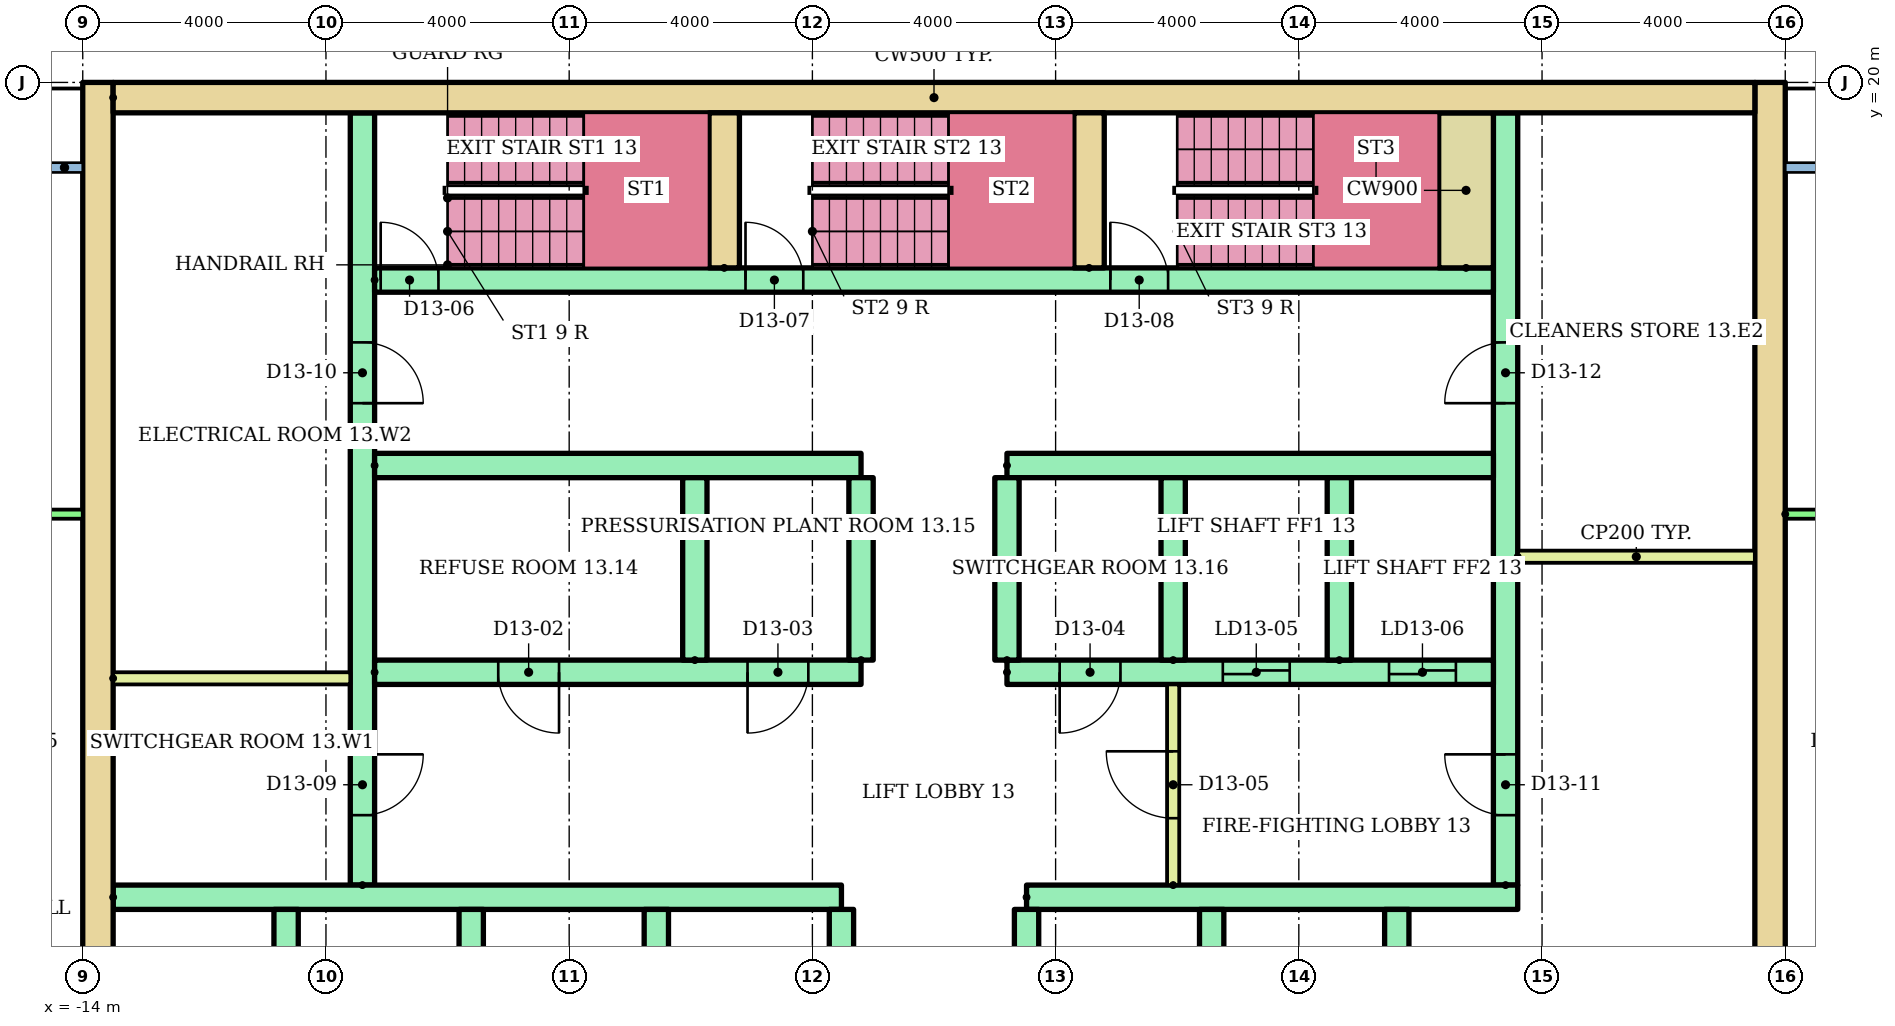
"""IFC4 building model, lengths in metres.
Left out: names, types, materials, properties, quantities, classifications, styles, units other than length and angle.
Written with IfcOpenShell. Run it as: python <this file> out.ifc"""

import sys

from ifc_helpers import new_model, si_unit, direction, frame, frame_2d, origin, place, context, subcontext, project, spatial, rectangle, extrude, element, fill, save


model = new_model("IFC4")
c1 = context("Model", 3, precision=1e-05, world=origin(), true_north=direction((0.0, 1.0)))
c2 = subcontext(c1, "Body", "Model", "MODEL_VIEW")
j1 = project(units=[si_unit("LENGTHUNIT", "METRE"), si_unit("PLANEANGLEUNIT", "RADIAN")], contexts=[c1])
p1 = place(None, origin())
s1 = spatial("IfcSite", under=j1, at=p1, CompositionType="ELEMENT")
p2 = place(p1, origin())
s2 = spatial("IfcBuilding", under=s1, at=p2, CompositionType="ELEMENT")
p3 = place(p2, frame((0.0, 0.0, 51.2)))
s3 = spatial("IfcBuildingStorey", under=s2, at=p3, CompositionType="ELEMENT", Elevation=51.2)
for number, where, z_axis, x_axis in (
    (1, (-13.75, 3.0, 0.0), (0.0, 0.0, 1.0), (0.0, 1.0, 0.0)),
    (2, (13.75, 3.0, 0.0), (0.0, 0.0, 1.0), (0.0, 1.0, 0.0)),
):
    element("IfcWall", number, at=place(p3, frame(where, z_axis=z_axis, x_axis=x_axis)), inside=s3, PredefinedType="SHEAR", context=c2, shape_type="SweptSolid", body=[
        extrude(rectangle(XDim=17.0, YDim=0.5, at=frame_2d((8.5, 0.0))), origin(), (0.0, 0.0, 1.0), 2.92),
    ])
p4 = place(p3, frame((-13.5, 19.75, 0.0)))
e3 = element("IfcWall", 3, at=p4, inside=s3, PredefinedType="SHEAR", context=c2, shape_type="SweptSolid", body=[
    extrude(rectangle(XDim=27.0, YDim=0.5, at=frame_2d((13.5, 0.0))), origin(), (0.0, 0.0, 1.0), 2.92),
])
p5 = place(p3, frame((-9.4, 6.8, 0.0), z_axis=(0.0, 0.0, 1.0), x_axis=(0.0, 1.0, 0.0)))
e4 = element("IfcWall", 4, at=p5, inside=s3, PredefinedType="SHEAR", context=c2, shape_type="SweptSolid", body=[
    extrude(rectangle(XDim=12.7, YDim=0.4, at=frame_2d((6.35, 0.0))), origin(), (0.0, 0.0, 1.0), 2.92),
])
p6 = place(p5, frame((1.15, 0.0, 0.0)))
e5 = element("IfcOpeningElement", 5, at=p6, cuts=e4, PredefinedType="OPENING", context=c2, shape_type="SweptSolid", body=[
    extrude(rectangle(XDim=1.0, YDim=2.1, at=frame_2d((0.5, 1.05))), frame((0.0, 0.21, 0.0), z_axis=(0.0, -1.0, 0.0), x_axis=(1.0, 0.0, 0.0)), (0.0, 0.0, 1.0), 0.42),
])
p7 = place(p5, frame((7.925, 0.0, 0.0)))
e6 = element("IfcOpeningElement", 6, at=p7, cuts=e4, PredefinedType="OPENING", context=c2, shape_type="SweptSolid", body=[
    extrude(rectangle(XDim=1.0, YDim=2.1, at=frame_2d((0.5, 1.05))), frame((0.0, 0.21, 0.0), z_axis=(0.0, -1.0, 0.0), x_axis=(1.0, 0.0, 0.0)), (0.0, 0.0, 1.0), 0.42),
])
p8 = place(p3, frame((9.4, 6.8, 0.0), z_axis=(0.0, 0.0, 1.0), x_axis=(0.0, 1.0, 0.0)))
e7 = element("IfcWall", 7, at=p8, inside=s3, PredefinedType="SHEAR", context=c2, shape_type="SweptSolid", body=[
    extrude(rectangle(XDim=12.7, YDim=0.4, at=frame_2d((6.35, 0.0))), origin(), (0.0, 0.0, 1.0), 2.92),
])
p9 = place(p8, frame((1.15, 0.0, 0.0)))
e8 = element("IfcOpeningElement", 8, at=p9, cuts=e7, PredefinedType="OPENING", context=c2, shape_type="SweptSolid", body=[
    extrude(rectangle(XDim=1.0, YDim=2.1, at=frame_2d((0.5, 1.05))), frame((0.0, 0.21, 0.0), z_axis=(0.0, -1.0, 0.0), x_axis=(1.0, 0.0, 0.0)), (0.0, 0.0, 1.0), 0.42),
])
p10 = place(p8, frame((7.925, 0.0, 0.0)))
e9 = element("IfcOpeningElement", 9, at=p10, cuts=e7, PredefinedType="OPENING", context=c2, shape_type="SweptSolid", body=[
    extrude(rectangle(XDim=1.0, YDim=2.1, at=frame_2d((0.5, 1.05))), frame((0.0, 0.21, 0.0), z_axis=(0.0, -1.0, 0.0), x_axis=(1.0, 0.0, 0.0)), (0.0, 0.0, 1.0), 0.42),
])
p11 = place(p3, frame((-13.5, 6.6, 0.0)))
e10 = element("IfcWall", 10, at=p11, inside=s3, PredefinedType="SHEAR", context=c2, shape_type="SweptSolid", body=[
    extrude(rectangle(XDim=11.978, YDim=0.4, at=frame_2d((5.989, 0.0))), origin(), (0.0, 0.0, 1.0), 2.92),
])
p12 = place(p3, frame((1.522, 6.6, 0.0)))
e11 = element("IfcWall", 11, at=p12, inside=s3, PredefinedType="SHEAR", context=c2, shape_type="SweptSolid", body=[
    extrude(rectangle(XDim=8.078, YDim=0.4, at=frame_2d((4.039, 0.0))), origin(), (0.0, 0.0, 1.0), 2.92),
])
for number, where, z_axis, x_axis in (
    (12, (-10.656, 3.4, 0.0), (0.0, 0.0, 1.0), (0.0, 1.0, 0.0)),
    (13, (-7.611, 3.4, 0.0), (0.0, 0.0, 1.0), (0.0, 1.0, 0.0)),
    (14, (-4.567, 3.4, 0.0), (0.0, 0.0, 1.0), (0.0, 1.0, 0.0)),
    (15, (-1.522, 3.4, 0.0), (0.0, 0.0, 1.0), (0.0, 1.0, 0.0)),
    (16, (1.522, 3.4, 0.0), (0.0, 0.0, 1.0), (0.0, 1.0, 0.0)),
    (17, (4.567, 3.4, 0.0), (0.0, 0.0, 1.0), (0.0, 1.0, 0.0)),
    (18, (7.611, 3.4, 0.0), (0.0, 0.0, 1.0), (0.0, 1.0, 0.0)),
):
    element("IfcWall", number, at=place(p3, frame(where, z_axis=z_axis, x_axis=x_axis)), inside=s3, PredefinedType="SHEAR", context=c2, shape_type="SweptSolid", body=[
        extrude(rectangle(XDim=3.0, YDim=0.4, at=frame_2d((1.5, 0.0))), origin(), (0.0, 0.0, 1.0), 2.92),
    ])
p13 = place(p3, frame((-9.2, 10.3, 0.0)))
e19 = element("IfcWall", 19, at=p13, inside=s3, PredefinedType="SHEAR", context=c2, shape_type="SweptSolid", body=[
    extrude(rectangle(XDim=8.0, YDim=0.4, at=frame_2d((4.0, 0.0))), origin(), (0.0, 0.0, 1.0), 2.92),
])
p14 = place(p13, frame((2.033, 0.0, 0.0)))
e20 = element("IfcOpeningElement", 20, at=p14, cuts=e19, PredefinedType="OPENING", context=c2, shape_type="SweptSolid", body=[
    extrude(rectangle(XDim=1.0, YDim=2.1, at=frame_2d((0.5, 1.05))), frame((0.0, 0.21, 0.0), z_axis=(0.0, -1.0, 0.0), x_axis=(1.0, 0.0, 0.0)), (0.0, 0.0, 1.0), 0.42),
])
p15 = place(p13, frame((6.133, 0.0, 0.0)))
e21 = element("IfcOpeningElement", 21, at=p15, cuts=e19, PredefinedType="OPENING", context=c2, shape_type="SweptSolid", body=[
    extrude(rectangle(XDim=1.0, YDim=2.1, at=frame_2d((0.5, 1.05))), frame((0.0, 0.21, 0.0), z_axis=(0.0, -1.0, 0.0), x_axis=(1.0, 0.0, 0.0)), (0.0, 0.0, 1.0), 0.42),
])
p16 = place(p3, frame((-9.2, 13.7, 0.0)))
e22 = element("IfcWall", 22, at=p16, inside=s3, PredefinedType="SHEAR", context=c2, shape_type="SweptSolid", body=[
    extrude(rectangle(XDim=8.0, YDim=0.4, at=frame_2d((4.0, 0.0))), origin(), (0.0, 0.0, 1.0), 2.92),
])
p17 = place(p3, frame((1.2, 10.3, 0.0)))
e23 = element("IfcWall", 23, at=p17, inside=s3, PredefinedType="SHEAR", context=c2, shape_type="SweptSolid", body=[
    extrude(rectangle(XDim=8.0, YDim=0.4, at=frame_2d((4.0, 0.0))), origin(), (0.0, 0.0, 1.0), 2.92),
])
p18 = place(p17, frame((3.55, 0.0, 0.0)))
e24 = element("IfcOpeningElement", 24, at=p18, cuts=e23, PredefinedType="OPENING", context=c2, shape_type="SweptSolid", body=[
    extrude(rectangle(XDim=1.1, YDim=2.1, at=frame_2d((0.55, 1.05))), frame((0.0, 0.21, 0.0), z_axis=(0.0, -1.0, 0.0), x_axis=(1.0, 0.0, 0.0)), (0.0, 0.0, 1.0), 0.42),
])
p19 = place(p17, frame((6.283, 0.0, 0.0)))
e25 = element("IfcOpeningElement", 25, at=p19, cuts=e23, PredefinedType="OPENING", context=c2, shape_type="SweptSolid", body=[
    extrude(rectangle(XDim=1.1, YDim=2.1, at=frame_2d((0.55, 1.05))), frame((0.0, 0.21, 0.0), z_axis=(0.0, -1.0, 0.0), x_axis=(1.0, 0.0, 0.0)), (0.0, 0.0, 1.0), 0.42),
])
p20 = place(p17, frame((0.867, 0.0, 0.0)))
e26 = element("IfcOpeningElement", 26, at=p20, cuts=e23, PredefinedType="OPENING", context=c2, shape_type="SweptSolid", body=[
    extrude(rectangle(XDim=1.0, YDim=2.1, at=frame_2d((0.5, 1.05))), frame((0.0, 0.21, 0.0), z_axis=(0.0, -1.0, 0.0), x_axis=(1.0, 0.0, 0.0)), (0.0, 0.0, 1.0), 0.42),
])
p21 = place(p3, frame((1.2, 13.7, 0.0)))
e27 = element("IfcWall", 27, at=p21, inside=s3, PredefinedType="SHEAR", context=c2, shape_type="SweptSolid", body=[
    extrude(rectangle(XDim=8.0, YDim=0.4, at=frame_2d((4.0, 0.0))), origin(), (0.0, 0.0, 1.0), 2.92),
])
for number, where, z_axis, x_axis in (
    (28, (-3.933, 10.5, 0.0), (0.0, 0.0, 1.0), (0.0, 1.0, 0.0)),
    (29, (-1.2, 10.5, 0.0), (0.0, 0.0, 1.0), (0.0, 1.0, 0.0)),
    (30, (1.2, 10.5, 0.0), (0.0, 0.0, 1.0), (0.0, 1.0, 0.0)),
    (31, (3.933, 10.5, 0.0), (0.0, 0.0, 1.0), (0.0, 1.0, 0.0)),
    (32, (6.667, 10.5, 0.0), (0.0, 0.0, 1.0), (0.0, 1.0, 0.0)),
):
    element("IfcWall", number, at=place(p3, frame(where, z_axis=z_axis, x_axis=x_axis)), inside=s3, PredefinedType="SHEAR", context=c2, shape_type="SweptSolid", body=[
        extrude(rectangle(XDim=3.0, YDim=0.4, at=frame_2d((1.5, 0.0))), origin(), (0.0, 0.0, 1.0), 2.92),
    ])
p22 = place(p3, frame((3.933, 6.8, 0.0), z_axis=(0.0, 0.0, 1.0), x_axis=(0.0, 1.0, 0.0)))
e33 = element("IfcWall", 33, at=p22, inside=s3, PredefinedType="PARTITIONING", context=c2, shape_type="SweptSolid", body=[
    extrude(rectangle(XDim=3.3, YDim=0.2, at=frame_2d((1.65, 0.0))), origin(), (0.0, 0.0, 1.0), 2.92),
])
p23 = place(p22, frame((1.1, 0.0, 0.0)))
e34 = element("IfcOpeningElement", 34, at=p23, cuts=e33, PredefinedType="OPENING", context=c2, shape_type="SweptSolid", body=[
    extrude(rectangle(XDim=1.1, YDim=2.1, at=frame_2d((0.55, 1.05))), frame((0.0, 0.11, 0.0), z_axis=(0.0, -1.0, 0.0), x_axis=(1.0, 0.0, 0.0)), (0.0, 0.0, 1.0), 0.22),
])
p24 = place(p3, frame((-9.2, 16.75, 0.0)))
e35 = element("IfcWall", 35, at=p24, inside=s3, PredefinedType="SHEAR", context=c2, shape_type="SweptSolid", body=[
    extrude(rectangle(XDim=18.4, YDim=0.4, at=frame_2d((9.2, 0.0))), origin(), (0.0, 0.0, 1.0), 2.92),
])
p25 = place(p24, frame((0.1, 0.0, 0.0)))
e36 = element("IfcOpeningElement", 36, at=p25, cuts=e35, PredefinedType="OPENING", context=c2, shape_type="SweptSolid", body=[
    extrude(rectangle(XDim=0.95, YDim=2.1, at=frame_2d((0.475, 1.05))), frame((0.0, 0.21, 0.0), z_axis=(0.0, -1.0, 0.0), x_axis=(1.0, 0.0, 0.0)), (0.0, 0.0, 1.0), 0.42),
])
p26 = place(p24, frame((6.1, 0.0, 0.0)))
e37 = element("IfcOpeningElement", 37, at=p26, cuts=e35, PredefinedType="OPENING", context=c2, shape_type="SweptSolid", body=[
    extrude(rectangle(XDim=0.95, YDim=2.1, at=frame_2d((0.475, 1.05))), frame((0.0, 0.21, 0.0), z_axis=(0.0, -1.0, 0.0), x_axis=(1.0, 0.0, 0.0)), (0.0, 0.0, 1.0), 0.42),
])
p27 = place(p24, frame((12.1, 0.0, 0.0)))
e38 = element("IfcOpeningElement", 38, at=p27, cuts=e35, PredefinedType="OPENING", context=c2, shape_type="SweptSolid", body=[
    extrude(rectangle(XDim=0.95, YDim=2.1, at=frame_2d((0.475, 1.05))), frame((0.0, 0.21, 0.0), z_axis=(0.0, -1.0, 0.0), x_axis=(1.0, 0.0, 0.0)), (0.0, 0.0, 1.0), 0.42),
])
for number, where, z_axis, x_axis in (
    (39, (-3.45, 16.95, 0.0), (0.0, 0.0, 1.0), (0.0, 1.0, 0.0)),
    (40, (2.55, 16.95, 0.0), (0.0, 0.0, 1.0), (0.0, 1.0, 0.0)),
):
    element("IfcWall", number, at=place(p3, frame(where, z_axis=z_axis, x_axis=x_axis)), inside=s3, PredefinedType="SHEAR", context=c2, shape_type="SweptSolid", body=[
        extrude(rectangle(XDim=2.55, YDim=0.5, at=frame_2d((1.275, 0.0))), origin(), (0.0, 0.0, 1.0), 2.92),
    ])
p28 = place(p3, frame((8.75, 16.95, 0.0), z_axis=(0.0, 0.0, 1.0), x_axis=(0.0, 1.0, 0.0)))
e41 = element("IfcWall", 41, at=p28, inside=s3, PredefinedType="SHEAR", context=c2, shape_type="SweptSolid", body=[
    extrude(rectangle(XDim=2.55, YDim=0.9, at=frame_2d((1.275, 0.0))), origin(), (0.0, 0.0, 1.0), 2.92),
])
for number, where in (
    (42, (-13.5, 10.2, 0.0)),
    (43, (9.6, 12.2, 0.0)),
):
    element("IfcWall", number, at=place(p3, frame(where)), inside=s3, PredefinedType="PARTITIONING", context=c2, shape_type="SweptSolid", body=[
        extrude(rectangle(XDim=3.9, YDim=0.2, at=frame_2d((1.95, 0.0))), origin(), (0.0, 0.0, 1.0), 2.92),
    ])
p29 = place(p3, frame((-22.0, 12.9, 0.0)))
e44 = element("IfcWall", 44, at=p29, inside=s3, PredefinedType="PARTITIONING", context=c2, shape_type="SweptSolid", body=[
    extrude(rectangle(XDim=8.0, YDim=0.15, at=frame_2d((4.0, 0.0))), origin(), (0.0, 0.0, 1.0), 2.4),
])
p30 = place(p29, frame((3.5, 0.0, 0.0)))
e45 = element("IfcOpeningElement", 45, at=p30, cuts=e44, PredefinedType="OPENING", context=c2, shape_type="SweptSolid", body=[
    extrude(rectangle(XDim=1.0, YDim=2.1, at=frame_2d((0.5, 1.05))), frame((0.0, 0.085, 0.0), z_axis=(0.0, -1.0, 0.0), x_axis=(1.0, 0.0, 0.0)), (0.0, 0.0, 1.0), 0.17),
])
p31 = place(p3, frame((14.0, 12.9, 0.0)))
e46 = element("IfcWall", 46, at=p31, inside=s3, PredefinedType="PARTITIONING", context=c2, shape_type="SweptSolid", body=[
    extrude(rectangle(XDim=22.52, YDim=0.15, at=frame_2d((11.26, 0.0))), origin(), (0.0, 0.0, 1.0), 2.4),
])
p32 = place(p31, frame((5.5, 0.0, 0.0)))
e47 = element("IfcOpeningElement", 47, at=p32, cuts=e46, PredefinedType="OPENING", context=c2, shape_type="SweptSolid", body=[
    extrude(rectangle(XDim=1.0, YDim=2.1, at=frame_2d((0.5, 1.05))), frame((0.0, 0.085, 0.0), z_axis=(0.0, -1.0, 0.0), x_axis=(1.0, 0.0, 0.0)), (0.0, 0.0, 1.0), 0.17),
])
p33 = place(p31, frame((14.75, 0.0, 0.0)))
e48 = element("IfcOpeningElement", 48, at=p33, cuts=e46, PredefinedType="OPENING", context=c2, shape_type="SweptSolid", body=[
    extrude(rectangle(XDim=0.9, YDim=2.1, at=frame_2d((0.45, 1.05))), frame((0.0, 0.085, 0.0), z_axis=(0.0, -1.0, 0.0), x_axis=(1.0, 0.0, 0.0)), (0.0, 0.0, 1.0), 0.17),
])
p34 = place(p31, frame((20.76, 0.0, 0.0)))
e49 = element("IfcOpeningElement", 49, at=p34, cuts=e46, PredefinedType="OPENING", context=c2, shape_type="SweptSolid", body=[
    extrude(rectangle(XDim=0.9, YDim=2.1, at=frame_2d((0.45, 1.05))), frame((0.0, 0.085, 0.0), z_axis=(0.0, -1.0, 0.0), x_axis=(1.0, 0.0, 0.0)), (0.0, 0.0, 1.0), 0.17),
])
p35 = place(p18, origin())
e50 = element("IfcDoor", 50, at=p35, inside=s3, OperationType="SLIDING_TO_LEFT", PredefinedType="DOOR", context=c2, shape_type="SweptSolid", body=[
    extrude(rectangle(XDim=1.1, YDim=2.1, at=frame_2d((0.55, 1.05))), frame((0.0, 0.025, 0.0), z_axis=(0.0, -1.0, 0.0), x_axis=(1.0, 0.0, 0.0)), (0.0, 0.0, 1.0), 0.05),
])
fill(e24, e50)
p36 = place(p19, origin())
e51 = element("IfcDoor", 51, at=p36, inside=s3, OperationType="SLIDING_TO_LEFT", PredefinedType="DOOR", context=c2, shape_type="SweptSolid", body=[
    extrude(rectangle(XDim=1.1, YDim=2.1, at=frame_2d((0.55, 1.05))), frame((0.0, 0.025, 0.0), z_axis=(0.0, -1.0, 0.0), x_axis=(1.0, 0.0, 0.0)), (0.0, 0.0, 1.0), 0.05),
])
fill(e25, e51)
p37 = place(p14, frame((1.0, 0.0, 0.0), z_axis=(0.0, 0.0, 1.0), x_axis=(-1.0, 0.0, 0.0)))
e52 = element("IfcDoor", 52, at=p37, inside=s3, OperationType="SINGLE_SWING_RIGHT", PredefinedType="DOOR", context=c2, shape_type="SweptSolid", body=[
    extrude(rectangle(XDim=1.0, YDim=2.1, at=frame_2d((0.5, 1.05))), frame((0.0, 0.025, 0.0), z_axis=(0.0, -1.0, 0.0), x_axis=(1.0, 0.0, 0.0)), (0.0, 0.0, 1.0), 0.05),
])
fill(e20, e52)
p38 = place(p15, frame((1.0, 0.0, 0.0), z_axis=(0.0, 0.0, 1.0), x_axis=(-1.0, 0.0, 0.0)))
e53 = element("IfcDoor", 53, at=p38, inside=s3, OperationType="SINGLE_SWING_LEFT", PredefinedType="DOOR", context=c2, shape_type="SweptSolid", body=[
    extrude(rectangle(XDim=1.0, YDim=2.1, at=frame_2d((0.5, 1.05))), frame((0.0, 0.025, 0.0), z_axis=(0.0, -1.0, 0.0), x_axis=(1.0, 0.0, 0.0)), (0.0, 0.0, 1.0), 0.05),
])
fill(e21, e53)
p39 = place(p20, frame((1.0, 0.0, 0.0), z_axis=(0.0, 0.0, 1.0), x_axis=(-1.0, 0.0, 0.0)))
e54 = element("IfcDoor", 54, at=p39, inside=s3, OperationType="SINGLE_SWING_LEFT", PredefinedType="DOOR", context=c2, shape_type="SweptSolid", body=[
    extrude(rectangle(XDim=1.0, YDim=2.1, at=frame_2d((0.5, 1.05))), frame((0.0, 0.025, 0.0), z_axis=(0.0, -1.0, 0.0), x_axis=(1.0, 0.0, 0.0)), (0.0, 0.0, 1.0), 0.05),
])
fill(e26, e54)
p40 = place(p23, origin())
e55 = element("IfcDoor", 55, at=p40, inside=s3, OperationType="SINGLE_SWING_RIGHT", PredefinedType="DOOR", context=c2, shape_type="SweptSolid", body=[
    extrude(rectangle(XDim=1.1, YDim=2.1, at=frame_2d((0.55, 1.05))), frame((0.0, 0.025, 0.0), z_axis=(0.0, -1.0, 0.0), x_axis=(1.0, 0.0, 0.0)), (0.0, 0.0, 1.0), 0.05),
])
fill(e34, e55)
p41 = place(p25, origin())
e56 = element("IfcDoor", 56, at=p41, inside=s3, OperationType="SINGLE_SWING_LEFT", PredefinedType="DOOR", context=c2, shape_type="SweptSolid", body=[
    extrude(rectangle(XDim=0.95, YDim=2.1, at=frame_2d((0.475, 1.05))), frame((0.0, 0.025, 0.0), z_axis=(0.0, -1.0, 0.0), x_axis=(1.0, 0.0, 0.0)), (0.0, 0.0, 1.0), 0.05),
])
fill(e36, e56)
p42 = place(p26, origin())
e57 = element("IfcDoor", 57, at=p42, inside=s3, OperationType="SINGLE_SWING_LEFT", PredefinedType="DOOR", context=c2, shape_type="SweptSolid", body=[
    extrude(rectangle(XDim=0.95, YDim=2.1, at=frame_2d((0.475, 1.05))), frame((0.0, 0.025, 0.0), z_axis=(0.0, -1.0, 0.0), x_axis=(1.0, 0.0, 0.0)), (0.0, 0.0, 1.0), 0.05),
])
fill(e37, e57)
p43 = place(p27, origin())
e58 = element("IfcDoor", 58, at=p43, inside=s3, OperationType="SINGLE_SWING_LEFT", PredefinedType="DOOR", context=c2, shape_type="SweptSolid", body=[
    extrude(rectangle(XDim=0.95, YDim=2.1, at=frame_2d((0.475, 1.05))), frame((0.0, 0.025, 0.0), z_axis=(0.0, -1.0, 0.0), x_axis=(1.0, 0.0, 0.0)), (0.0, 0.0, 1.0), 0.05),
])
fill(e38, e58)
p44 = place(p6, frame((1.0, 0.0, 0.0), z_axis=(0.0, 0.0, 1.0), x_axis=(-1.0, 0.0, 0.0)))
e59 = element("IfcDoor", 59, at=p44, inside=s3, OperationType="SINGLE_SWING_RIGHT", PredefinedType="DOOR", context=c2, shape_type="SweptSolid", body=[
    extrude(rectangle(XDim=1.0, YDim=2.1, at=frame_2d((0.5, 1.05))), frame((0.0, 0.025, 0.0), z_axis=(0.0, -1.0, 0.0), x_axis=(1.0, 0.0, 0.0)), (0.0, 0.0, 1.0), 0.05),
])
fill(e5, e59)
p45 = place(p7, frame((1.0, 0.0, 0.0), z_axis=(0.0, 0.0, 1.0), x_axis=(-1.0, 0.0, 0.0)))
e60 = element("IfcDoor", 60, at=p45, inside=s3, OperationType="SINGLE_SWING_LEFT", PredefinedType="DOOR", context=c2, shape_type="SweptSolid", body=[
    extrude(rectangle(XDim=1.0, YDim=2.1, at=frame_2d((0.5, 1.05))), frame((0.0, 0.025, 0.0), z_axis=(0.0, -1.0, 0.0), x_axis=(1.0, 0.0, 0.0)), (0.0, 0.0, 1.0), 0.05),
])
fill(e6, e60)
p46 = place(p9, origin())
e61 = element("IfcDoor", 61, at=p46, inside=s3, OperationType="SINGLE_SWING_RIGHT", PredefinedType="DOOR", context=c2, shape_type="SweptSolid", body=[
    extrude(rectangle(XDim=1.0, YDim=2.1, at=frame_2d((0.5, 1.05))), frame((0.0, 0.025, 0.0), z_axis=(0.0, -1.0, 0.0), x_axis=(1.0, 0.0, 0.0)), (0.0, 0.0, 1.0), 0.05),
])
fill(e8, e61)
p47 = place(p10, origin())
e62 = element("IfcDoor", 62, at=p47, inside=s3, OperationType="SINGLE_SWING_LEFT", PredefinedType="DOOR", context=c2, shape_type="SweptSolid", body=[
    extrude(rectangle(XDim=1.0, YDim=2.1, at=frame_2d((0.5, 1.05))), frame((0.0, 0.025, 0.0), z_axis=(0.0, -1.0, 0.0), x_axis=(1.0, 0.0, 0.0)), (0.0, 0.0, 1.0), 0.05),
])
fill(e9, e62)
save(model, sys.argv[1])
